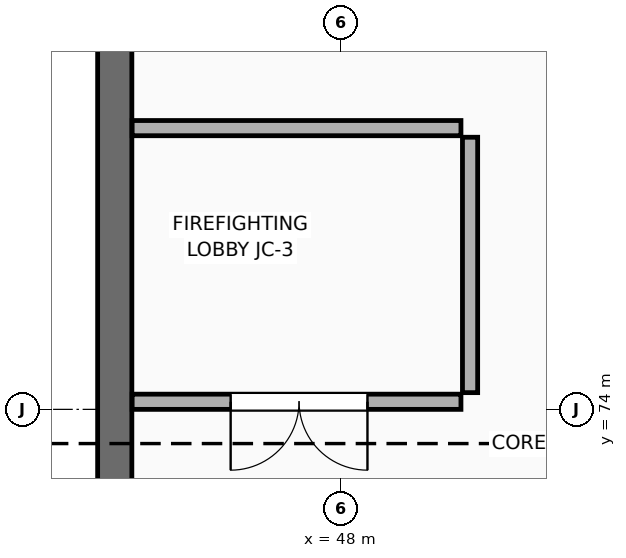
"""IFC4 building model, lengths in metres.
Left out: names, types, materials, properties, quantities, classifications, styles, units other than length and angle.
Written with IfcOpenShell. Run it as: python <this file> out.ifc"""

import sys

from ifc_helpers import new_model, si_unit, direction, frame, frame_2d, origin, place, context, subcontext, project, spatial, rectangle, extrude, element, fill, save


model = new_model("IFC4")
c1 = context("Model", 3, precision=1e-05, world=origin(), true_north=direction((0.0, 1.0)))
c2 = subcontext(c1, "Body", "Model", "MODEL_VIEW")
j1 = project(units=[si_unit("LENGTHUNIT", "METRE"), si_unit("PLANEANGLEUNIT", "RADIAN")], contexts=[c1])
p1 = place(None, origin())
s1 = spatial("IfcSite", under=j1, at=p1, CompositionType="ELEMENT")
p2 = place(p1, origin())
s2 = spatial("IfcBuilding", under=s1, at=p2, CompositionType="ELEMENT")
p3 = place(p2, frame((0.0, 0.0, -4.8)))
s3 = spatial("IfcBuildingStorey", under=s2, at=p3, CompositionType="ELEMENT", Elevation=-4.8)
p4 = place(p3, frame((45.025, 56.845, 0.0), z_axis=(0.0, 0.0, 1.0), x_axis=(0.0, 1.0, 0.0)))
e1 = element("IfcWall", 1, at=p4, inside=s3, PredefinedType="USERDEFINED", context=c2, shape_type="SweptSolid", body=[
    extrude(rectangle(XDim=25.91, YDim=0.45, at=frame_2d((12.955, 0.0))), origin(), (0.0, 0.0, 1.0), 4.38),
])
p5 = place(p3, frame((45.254, 77.7, 0.0), z_axis=(0.0, 0.0, 1.0), x_axis=(1.0, 0.0, 0.0)))
e2 = element("IfcWall", 2, at=p5, inside=s3, PredefinedType="PARTITIONING", context=c2, shape_type="SweptSolid", body=[
    extrude(rectangle(XDim=4.326, YDim=0.2, at=frame_2d((2.163, 0.0))), origin(), (0.0, 0.0, 1.0), 4.47),
])
p6 = place(p3, frame((49.7, 77.58, 0.0), z_axis=(0.0, 0.0, 1.0), x_axis=(0.0, -1.0, 0.0)))
e3 = element("IfcWall", 3, at=p6, inside=s3, PredefinedType="PARTITIONING", context=c2, shape_type="SweptSolid", body=[
    extrude(rectangle(XDim=3.36, YDim=0.2, at=frame_2d((1.68, 0.0))), origin(), (0.0, 0.0, 1.0), 4.47),
])
p7 = place(p3, frame((49.58, 74.1, 0.0), z_axis=(0.0, 0.0, 1.0), x_axis=(-1.0, 0.0, 0.0)))
e4 = element("IfcWall", 4, at=p7, inside=s3, PredefinedType="PARTITIONING", context=c2, shape_type="SweptSolid", body=[
    extrude(rectangle(XDim=4.326, YDim=0.2, at=frame_2d((2.163, 0.0))), origin(), (0.0, 0.0, 1.0), 4.47),
])
p8 = place(p7, frame((1.23, 0.0, 0.0)))
e5 = element("IfcOpeningElement", 5, at=p8, cuts=e4, PredefinedType="OPENING", context=c2, shape_type="SweptSolid", body=[
    extrude(rectangle(XDim=1.8, YDim=2.15, at=frame_2d((0.9, 1.075))), frame((0.0, 0.11, 0.0), z_axis=(0.0, -1.0, 0.0), x_axis=(1.0, 0.0, 0.0)), (0.0, 0.0, 1.0), 0.22),
])
p9 = place(p8, origin())
e6 = element("IfcDoor", 6, at=p9, inside=s3, OperationType="DOUBLE_DOOR_SINGLE_SWING", PredefinedType="DOOR", context=c2, shape_type="SweptSolid", body=[
    extrude(rectangle(XDim=1.8, YDim=2.15, at=frame_2d((0.9, 1.075))), frame((0.0, 0.025, 0.0), z_axis=(0.0, -1.0, 0.0), x_axis=(1.0, 0.0, 0.0)), (0.0, 0.0, 1.0), 0.05),
])
fill(e5, e6)
save(model, sys.argv[1])
